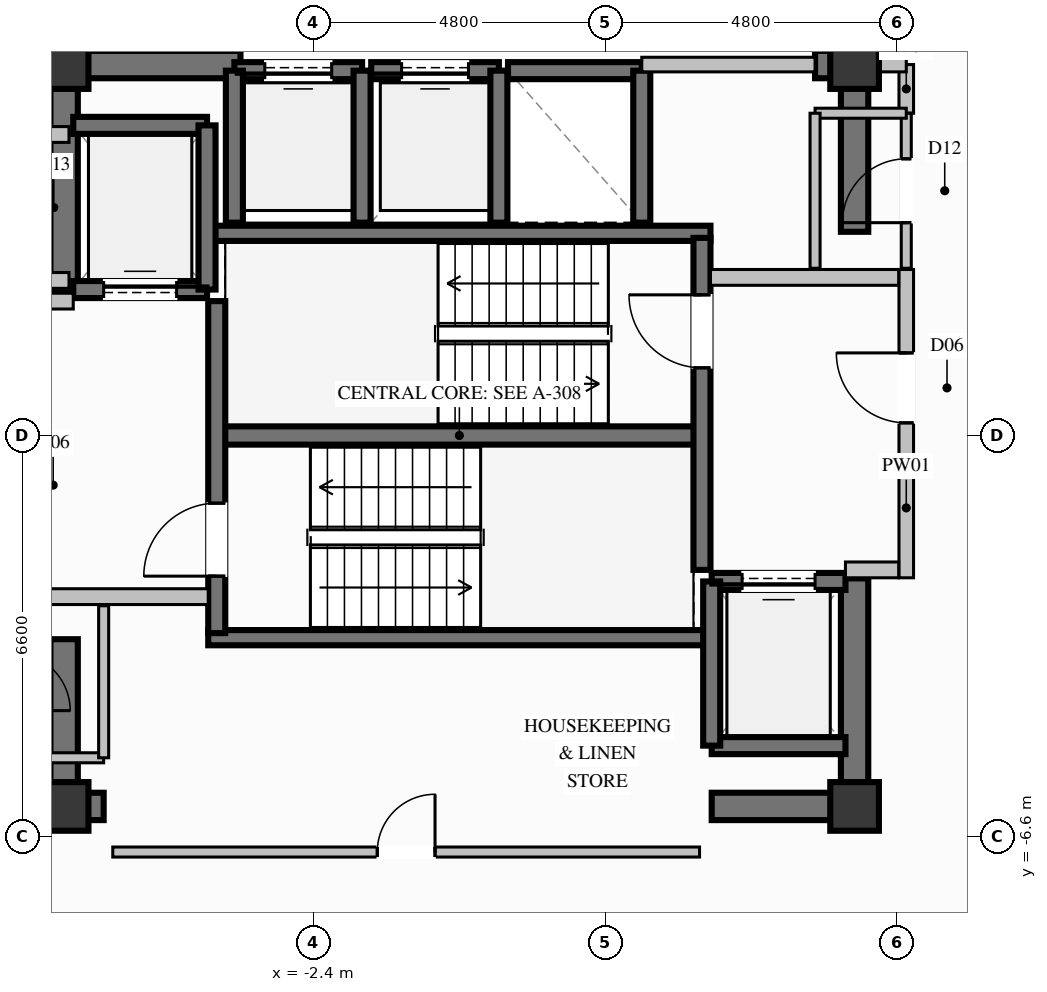
"""IFC4 building model, lengths in metres.
Left out: names, types, materials, properties, quantities, classifications, styles, units other than length and angle.
Written with IfcOpenShell. Run it as: python <this file> out.ifc"""

import sys

from ifc_helpers import new_model, si_unit, direction, frame, frame_2d, origin, origin_2d, place, context, subcontext, project, spatial, rectangle, extrude, element, fill, save


model = new_model("IFC4")
c1 = context("Model", 3, precision=1e-05, world=origin(), true_north=direction((0.0, 1.0)))
c2 = subcontext(c1, "Body", "Model", "MODEL_VIEW")
j1 = project(units=[si_unit("LENGTHUNIT", "METRE"), si_unit("PLANEANGLEUNIT", "RADIAN")], contexts=[c1])
p1 = place(None, origin())
s1 = spatial("IfcSite", under=j1, at=p1, CompositionType="ELEMENT")
p2 = place(p1, origin())
s2 = spatial("IfcBuilding", under=s1, at=p2, CompositionType="ELEMENT")
p3 = place(p2, frame((0.0, 0.0, 250.6)))
s3 = spatial("IfcBuildingStorey", under=s2, at=p3, CompositionType="ELEMENT", Elevation=250.6)
for number, where, z_axis, x_axis in (
    (1, (-6.5, -6.1, 0.0), (0.0, 0.0, 1.0), (1.0, 0.0, 0.0)),
    (2, (6.5, -6.1, 0.0), (0.0, 0.0, 1.0), (1.0, 0.0, 0.0)),
    (3, (6.5, 6.1, 0.0), (0.0, 0.0, 1.0), (1.0, 0.0, 0.0)),
    (4, (-6.5, 6.1, 0.0), (0.0, 0.0, 1.0), (1.0, 0.0, 0.0)),
):
    element("IfcColumn", number, at=place(p3, frame(where, z_axis=z_axis, x_axis=x_axis)), inside=s3, PredefinedType="COLUMN", context=c2, shape_type="SweptSolid", body=[
        extrude(rectangle(XDim=0.8, YDim=0.8, at=origin_2d()), origin(), (0.0, 0.0, 1.0), 3.8),
    ])
p4 = place(p3, frame((-3.99, 0.0, 0.0), z_axis=(0.0, 0.0, 1.0), x_axis=(1.0, 0.0, 0.0)))
e5 = element("IfcWall", 5, at=p4, inside=s3, PredefinedType="SHEAR", context=c2, shape_type="SweptSolid", body=[
    extrude(rectangle(XDim=7.98, YDim=0.3, at=frame_2d((3.99, 0.0))), origin(), (0.0, 0.0, 1.0), 3.8),
])
for number, where, z_axis, x_axis in (
    (6, (-4.13, -3.325, 0.0), (0.0, 0.0, 1.0), (1.0, 0.0, 0.0)),
    (7, (-4.13, 3.325, 0.0), (0.0, 0.0, 1.0), (1.0, 0.0, 0.0)),
):
    element("IfcWall", number, at=place(p3, frame(where, z_axis=z_axis, x_axis=x_axis)), inside=s3, PredefinedType="SOLIDWALL", context=c2, shape_type="SweptSolid", body=[
        extrude(rectangle(XDim=8.26, YDim=0.25, at=frame_2d((4.13, 0.0))), origin(), (0.0, 0.0, 1.0), 3.8),
    ])
p5 = place(p3, frame((-6.275, -6.1, 0.0), z_axis=(0.0, 0.0, 1.0), x_axis=(1.0, 0.0, 0.0)))
e8 = element("IfcWall", 8, at=p5, inside=s3, PredefinedType="SHEAR", context=c2, shape_type="SweptSolid", body=[
    extrude(rectangle(XDim=0.425, YDim=0.45, at=frame_2d((0.212, 0.0))), origin(), (0.0, 0.0, 1.0), 3.8),
])
p6 = place(p3, frame((4.15, -6.1, 0.0), z_axis=(0.0, 0.0, 1.0), x_axis=(1.0, 0.0, 0.0)))
e9 = element("IfcWall", 9, at=p6, inside=s3, PredefinedType="SHEAR", context=c2, shape_type="SweptSolid", body=[
    extrude(rectangle(XDim=2.125, YDim=0.45, at=frame_2d((1.062, 0.0))), origin(), (0.0, 0.0, 1.0), 3.8),
])
p7 = place(p3, frame((-6.275, 6.1, 0.0), z_axis=(0.0, 0.0, 1.0), x_axis=(1.0, 0.0, 0.0)))
e10 = element("IfcWall", 10, at=p7, inside=s3, PredefinedType="SHEAR", context=c2, shape_type="SweptSolid", body=[
    extrude(rectangle(XDim=2.675, YDim=0.45, at=frame_2d((1.337, 0.0))), origin(), (0.0, 0.0, 1.0), 3.8),
])
p8 = place(p3, frame((5.85, 6.1, 0.0), z_axis=(0.0, 0.0, 1.0), x_axis=(1.0, 0.0, 0.0)))
e11 = element("IfcWall", 11, at=p8, inside=s3, PredefinedType="SHEAR", context=c2, shape_type="SweptSolid", body=[
    extrude(rectangle(XDim=0.425, YDim=0.45, at=frame_2d((0.212, 0.0))), origin(), (0.0, 0.0, 1.0), 3.8),
])
p9 = place(p3, frame((-6.5, 2.35, 0.0), z_axis=(0.0, 0.0, 1.0), x_axis=(0.0, 1.0, 0.0)))
e12 = element("IfcWall", 12, at=p9, inside=s3, PredefinedType="SHEAR", context=c2, shape_type="SweptSolid", body=[
    extrude(rectangle(XDim=3.975, YDim=0.45, at=frame_2d((1.987, 0.0))), origin(), (0.0, 0.0, 1.0), 3.8),
])
p10 = place(p3, frame((-6.5, -6.325, 0.0), z_axis=(0.0, 0.0, 1.0), x_axis=(0.0, 1.0, 0.0)))
e13 = element("IfcWall", 13, at=p10, inside=s3, PredefinedType="SHEAR", context=c2, shape_type="SweptSolid", body=[
    extrude(rectangle(XDim=2.975, YDim=0.45, at=frame_2d((1.487, 0.0))), origin(), (0.0, 0.0, 1.0), 3.8),
])
p11 = place(p3, frame((6.5, -6.325, 0.0), z_axis=(0.0, 0.0, 1.0), x_axis=(0.0, 1.0, 0.0)))
e14 = element("IfcWall", 14, at=p11, inside=s3, PredefinedType="SHEAR", context=c2, shape_type="SweptSolid", body=[
    extrude(rectangle(XDim=3.975, YDim=0.45, at=frame_2d((1.987, 0.0))), origin(), (0.0, 0.0, 1.0), 3.8),
])
p12 = place(p3, frame((6.5, 3.35, 0.0), z_axis=(0.0, 0.0, 1.0), x_axis=(0.0, 1.0, 0.0)))
e15 = element("IfcWall", 15, at=p12, inside=s3, PredefinedType="SHEAR", context=c2, shape_type="SweptSolid", body=[
    extrude(rectangle(XDim=2.975, YDim=0.45, at=frame_2d((1.487, 0.0))), origin(), (0.0, 0.0, 1.0), 3.8),
])
p13 = place(p3, frame((-1.6, 6.0, 0.0), z_axis=(0.0, 0.0, 1.0), x_axis=(-1.0, 0.0, 0.0)))
e16 = element("IfcWall", 16, at=p13, inside=s3, PredefinedType="SOLIDWALL", context=c2, shape_type="SweptSolid", body=[
    extrude(rectangle(XDim=2.1, YDim=0.28, at=frame_2d((1.05, 0.0))), origin(), (0.0, 0.0, 1.0), 3.57),
])
p14 = place(p13, frame((0.5, 0.0, 0.0)))
e17 = element("IfcOpeningElement", 17, at=p14, cuts=e16, PredefinedType="OPENING", context=c2, shape_type="SweptSolid", body=[
    extrude(rectangle(XDim=1.1, YDim=2.2, at=frame_2d((0.55, 1.1))), frame((0.0, 0.15, 0.0), z_axis=(0.0, -1.0, 0.0), x_axis=(1.0, 0.0, 0.0)), (0.0, 0.0, 1.0), 0.3),
])
for number, where, z_axis, x_axis in (
    (18, (-3.7, 6.0, 0.0), (0.0, 0.0, 1.0), (0.0, -1.0, 0.0)),
    (19, (-1.6, 3.5, 0.0), (0.0, 0.0, 1.0), (0.0, 1.0, 0.0)),
):
    element("IfcWall", number, at=place(p3, frame(where, z_axis=z_axis, x_axis=x_axis)), inside=s3, PredefinedType="SOLIDWALL", context=c2, shape_type="SweptSolid", body=[
        extrude(rectangle(XDim=2.5, YDim=0.28, at=frame_2d((1.25, 0.0))), origin(), (0.0, 0.0, 1.0), 3.57),
    ])
p15 = place(p3, frame((0.65, 6.0, 0.0), z_axis=(0.0, 0.0, 1.0), x_axis=(-1.0, 0.0, 0.0)))
e20 = element("IfcWall", 20, at=p15, inside=s3, PredefinedType="SOLIDWALL", context=c2, shape_type="SweptSolid", body=[
    extrude(rectangle(XDim=2.1, YDim=0.28, at=frame_2d((1.05, 0.0))), origin(), (0.0, 0.0, 1.0), 3.57),
])
p16 = place(p15, frame((0.5, 0.0, 0.0)))
e21 = element("IfcOpeningElement", 21, at=p16, cuts=e20, PredefinedType="OPENING", context=c2, shape_type="SweptSolid", body=[
    extrude(rectangle(XDim=1.1, YDim=2.2, at=frame_2d((0.55, 1.1))), frame((0.0, 0.15, 0.0), z_axis=(0.0, -1.0, 0.0), x_axis=(1.0, 0.0, 0.0)), (0.0, 0.0, 1.0), 0.3),
])
p17 = place(p3, frame((0.65, 3.5, 0.0), z_axis=(0.0, 0.0, 1.0), x_axis=(0.0, 1.0, 0.0)))
e22 = element("IfcWall", 22, at=p17, inside=s3, PredefinedType="SOLIDWALL", context=c2, shape_type="SweptSolid", body=[
    extrude(rectangle(XDim=2.5, YDim=0.28, at=frame_2d((1.25, 0.0))), origin(), (0.0, 0.0, 1.0), 3.57),
])
p18 = place(p3, frame((3.0, 6.0, 0.0), z_axis=(0.0, 0.0, 1.0), x_axis=(-1.0, 0.0, 0.0)))
e23 = element("IfcWall", 23, at=p18, inside=s3, PredefinedType="SOLIDWALL", context=c2, shape_type="SweptSolid", body=[
    extrude(rectangle(XDim=2.2, YDim=0.28, at=frame_2d((1.1, 0.0))), origin(), (0.0, 0.0, 1.0), 3.57),
])
p19 = place(p3, frame((3.0, 3.5, 0.0), z_axis=(0.0, 0.0, 1.0), x_axis=(0.0, 1.0, 0.0)))
e24 = element("IfcWall", 24, at=p19, inside=s3, PredefinedType="SOLIDWALL", context=c2, shape_type="SweptSolid", body=[
    extrude(rectangle(XDim=2.5, YDim=0.28, at=frame_2d((1.25, 0.0))), origin(), (0.0, 0.0, 1.0), 3.57),
])
p20 = place(p3, frame((-6.35, 2.4, 0.0), z_axis=(0.0, 0.0, 1.0), x_axis=(1.0, 0.0, 0.0)))
e25 = element("IfcWall", 25, at=p20, inside=s3, PredefinedType="SOLIDWALL", context=c2, shape_type="SweptSolid", body=[
    extrude(rectangle(XDim=2.2, YDim=0.28, at=frame_2d((1.1, 0.0))), origin(), (0.0, 0.0, 1.0), 3.57),
])
p21 = place(p20, frame((0.5, 0.0, 0.0)))
e26 = element("IfcOpeningElement", 26, at=p21, cuts=e25, PredefinedType="OPENING", context=c2, shape_type="SweptSolid", body=[
    extrude(rectangle(XDim=1.2, YDim=2.2, at=frame_2d((0.6, 1.1))), frame((0.0, 0.15, 0.0), z_axis=(0.0, -1.0, 0.0), x_axis=(1.0, 0.0, 0.0)), (0.0, 0.0, 1.0), 0.3),
])
p22 = place(p3, frame((-4.15, 5.1, 0.0), z_axis=(0.0, 0.0, 1.0), x_axis=(-1.0, 0.0, 0.0)))
e27 = element("IfcWall", 27, at=p22, inside=s3, PredefinedType="SOLIDWALL", context=c2, shape_type="SweptSolid", body=[
    extrude(rectangle(XDim=2.2, YDim=0.28, at=frame_2d((1.1, 0.0))), origin(), (0.0, 0.0, 1.0), 3.57),
])
p23 = place(p3, frame((-4.15, 2.4, 0.0), z_axis=(0.0, 0.0, 1.0), x_axis=(0.0, 1.0, 0.0)))
e28 = element("IfcWall", 28, at=p23, inside=s3, PredefinedType="SOLIDWALL", context=c2, shape_type="SweptSolid", body=[
    extrude(rectangle(XDim=2.7, YDim=0.28, at=frame_2d((1.35, 0.0))), origin(), (0.0, 0.0, 1.0), 3.57),
])
p24 = place(p3, frame((4.15, -5.1, 0.0), z_axis=(0.0, 0.0, 1.0), x_axis=(1.0, 0.0, 0.0)))
e29 = element("IfcWall", 29, at=p24, inside=s3, PredefinedType="SOLIDWALL", context=c2, shape_type="SweptSolid", body=[
    extrude(rectangle(XDim=2.2, YDim=0.28, at=frame_2d((1.1, 0.0))), origin(), (0.0, 0.0, 1.0), 3.57),
])
p25 = place(p3, frame((6.35, -2.4, 0.0), z_axis=(0.0, 0.0, 1.0), x_axis=(-1.0, 0.0, 0.0)))
e30 = element("IfcWall", 30, at=p25, inside=s3, PredefinedType="SOLIDWALL", context=c2, shape_type="SweptSolid", body=[
    extrude(rectangle(XDim=2.2, YDim=0.28, at=frame_2d((1.1, 0.0))), origin(), (0.0, 0.0, 1.0), 3.57),
])
p26 = place(p25, frame((0.5, 0.0, 0.0)))
e31 = element("IfcOpeningElement", 31, at=p26, cuts=e30, PredefinedType="OPENING", context=c2, shape_type="SweptSolid", body=[
    extrude(rectangle(XDim=1.2, YDim=2.2, at=frame_2d((0.6, 1.1))), frame((0.0, 0.15, 0.0), z_axis=(0.0, -1.0, 0.0), x_axis=(1.0, 0.0, 0.0)), (0.0, 0.0, 1.0), 0.3),
])
p27 = place(p3, frame((4.15, -2.4, 0.0), z_axis=(0.0, 0.0, 1.0), x_axis=(0.0, -1.0, 0.0)))
e32 = element("IfcWall", 32, at=p27, inside=s3, PredefinedType="SOLIDWALL", context=c2, shape_type="SweptSolid", body=[
    extrude(rectangle(XDim=2.7, YDim=0.28, at=frame_2d((1.35, 0.0))), origin(), (0.0, 0.0, 1.0), 3.57),
])
p28 = place(p3, frame((-3.99, -3.25, 0.0), z_axis=(0.0, 0.0, 1.0), x_axis=(0.0, 1.0, 0.0)))
e33 = element("IfcWall", 33, at=p28, inside=s3, PredefinedType="SOLIDWALL", context=c2, shape_type="SweptSolid", body=[
    extrude(rectangle(XDim=5.46, YDim=0.28, at=frame_2d((2.73, 0.0))), origin(), (0.0, 0.0, 1.0), 3.57),
])
p29 = place(p28, frame((0.937, 0.0, 0.0)))
e34 = element("IfcOpeningElement", 34, at=p29, cuts=e33, PredefinedType="OPENING", context=c2, shape_type="SweptSolid", body=[
    extrude(rectangle(XDim=1.2, YDim=2.2, at=frame_2d((0.6, 1.1))), frame((0.0, 0.15, 0.0), z_axis=(0.0, -1.0, 0.0), x_axis=(1.0, 0.0, 0.0)), (0.0, 0.0, 1.0), 0.3),
])
p30 = place(p3, frame((3.99, -2.21, 0.0), z_axis=(0.0, 0.0, 1.0), x_axis=(0.0, 1.0, 0.0)))
e35 = element("IfcWall", 35, at=p30, inside=s3, PredefinedType="SOLIDWALL", context=c2, shape_type="SweptSolid", body=[
    extrude(rectangle(XDim=5.46, YDim=0.28, at=frame_2d((2.73, 0.0))), origin(), (0.0, 0.0, 1.0), 3.57),
])
p31 = place(p30, frame((3.323, 0.0, 0.0)))
e36 = element("IfcOpeningElement", 36, at=p31, cuts=e35, PredefinedType="OPENING", context=c2, shape_type="SweptSolid", body=[
    extrude(rectangle(XDim=1.2, YDim=2.2, at=frame_2d((0.6, 1.1))), frame((0.0, 0.15, 0.0), z_axis=(0.0, -1.0, 0.0), x_axis=(1.0, 0.0, 0.0)), (0.0, 0.0, 1.0), 0.3),
])
p32 = place(p3, frame((-7.225, -2.65, 0.0), z_axis=(0.0, 0.0, 1.0), x_axis=(1.0, 0.0, 0.0)))
e37 = element("IfcWall", 37, at=p32, inside=s3, PredefinedType="PARTITIONING", context=c2, shape_type="SweptSolid", body=[
    extrude(rectangle(XDim=3.095, YDim=0.26, at=frame_2d((1.548, 0.0))), origin(), (0.0, 0.0, 1.0), 3.57),
])
p33 = place(p3, frame((-7.225, 2.21, 0.0), z_axis=(0.0, 0.0, 1.0), x_axis=(1.0, 0.0, 0.0)))
e38 = element("IfcWall", 38, at=p33, inside=s3, PredefinedType="PARTITIONING", context=c2, shape_type="SweptSolid", body=[
    extrude(rectangle(XDim=0.875, YDim=0.26, at=frame_2d((0.438, 0.0))), origin(), (0.0, 0.0, 1.0), 3.57),
])
p34 = place(p3, frame((7.35, -2.34, 0.0), z_axis=(0.0, 0.0, 1.0), x_axis=(0.0, 1.0, 0.0)))
e39 = element("IfcWall", 39, at=p34, inside=s3, PredefinedType="PARTITIONING", context=c2, shape_type="SweptSolid", body=[
    extrude(rectangle(XDim=5.07, YDim=0.24, at=frame_2d((2.535, 0.0))), origin(), (0.0, 0.0, 1.0), 2.655),
])
p35 = place(p34, frame((2.548, 0.0, 0.0)))
e40 = element("IfcOpeningElement", 40, at=p35, cuts=e39, PredefinedType="OPENING", context=c2, shape_type="SweptSolid", body=[
    extrude(rectangle(XDim=1.15, YDim=2.2, at=frame_2d((0.575, 1.1))), frame((0.0, 0.13, 0.0), z_axis=(0.0, -1.0, 0.0), x_axis=(1.0, 0.0, 0.0)), (0.0, 0.0, 1.0), 0.26),
])
p36 = place(p3, frame((6.35, -2.21, 0.0), z_axis=(0.0, 0.0, 1.0), x_axis=(1.0, 0.0, 0.0)))
e41 = element("IfcWall", 41, at=p36, inside=s3, PredefinedType="PARTITIONING", context=c2, shape_type="SweptSolid", body=[
    extrude(rectangle(XDim=0.875, YDim=0.26, at=frame_2d((0.438, 0.0))), origin(), (0.0, 0.0, 1.0), 3.57),
])
p37 = place(p3, frame((4.13, 2.6, 0.0), z_axis=(0.0, 0.0, 1.0), x_axis=(1.0, 0.0, 0.0)))
e42 = element("IfcWall", 42, at=p37, inside=s3, PredefinedType="PARTITIONING", context=c2, shape_type="SweptSolid", body=[
    extrude(rectangle(XDim=3.095, YDim=0.26, at=frame_2d((1.548, 0.0))), origin(), (0.0, 0.0, 1.0), 3.57),
])
for number, where, z_axis, x_axis in (
    (43, (-7.35, 4.95, 0.0), (0.0, 0.0, 1.0), (1.0, 0.0, 0.0)),
    (44, (-7.35, 2.55, 0.0), (0.0, 0.0, 1.0), (1.0, 0.0, 0.0)),
):
    element("IfcWall", number, at=place(p3, frame(where, z_axis=z_axis, x_axis=x_axis)), inside=s3, PredefinedType="PARTITIONING", context=c2, shape_type="SweptSolid", body=[
        extrude(rectangle(XDim=0.93, YDim=0.26, at=frame_2d((0.465, 0.0))), origin(), (0.0, 0.0, 1.0), 3.57),
    ])
p38 = place(p3, frame((3.0, 6.1, 0.0), z_axis=(0.0, 0.0, 1.0), x_axis=(1.0, 0.0, 0.0)))
e45 = element("IfcWall", 45, at=p38, inside=s3, PredefinedType="PARTITIONING", context=c2, shape_type="SweptSolid", body=[
    extrude(rectangle(XDim=2.85, YDim=0.24, at=frame_2d((1.425, 0.0))), origin(), (0.0, 0.0, 1.0), 2.655),
])
p39 = place(p3, frame((7.35, 5.3, 0.0), z_axis=(0.0, 0.0, 1.0), x_axis=(0.0, 1.0, 0.0)))
e46 = element("IfcWall", 46, at=p39, inside=s3, PredefinedType="PARTITIONING", context=c2, shape_type="SweptSolid", body=[
    extrude(rectangle(XDim=0.8, YDim=0.24, at=frame_2d((0.4, 0.0))), origin(), (0.0, 0.0, 1.0), 2.655),
])
for number, where, z_axis, x_axis in (
    (47, (6.5, 6.1, 0.0), (0.0, 0.0, 1.0), (1.0, 0.0, 0.0)),
    (48, (-7.35, 6.1, 0.0), (0.0, 0.0, 1.0), (1.0, 0.0, 0.0)),
):
    element("IfcWall", number, at=place(p3, frame(where, z_axis=z_axis, x_axis=x_axis)), inside=s3, PredefinedType="PARTITIONING", context=c2, shape_type="SweptSolid", body=[
        extrude(rectangle(XDim=0.85, YDim=0.24, at=frame_2d((0.425, 0.0))), origin(), (0.0, 0.0, 1.0), 3.086),
    ])
p40 = place(p3, frame((-7.35, -5.3, 0.0), z_axis=(0.0, 0.0, 1.0), x_axis=(1.0, 0.0, 0.0)))
e49 = element("IfcWall", 49, at=p40, inside=s3, PredefinedType="PARTITIONING", context=c2, shape_type="SweptSolid", body=[
    extrude(rectangle(XDim=1.5, YDim=0.165, at=frame_2d((0.75, 0.0))), origin(), (0.0, 0.0, 1.0), 2.655),
])
p41 = place(p3, frame((-5.85, -5.3, 0.0), z_axis=(0.0, 0.0, 1.0), x_axis=(0.0, 1.0, 0.0)))
e50 = element("IfcWall", 50, at=p41, inside=s3, PredefinedType="PARTITIONING", context=c2, shape_type="SweptSolid", body=[
    extrude(rectangle(XDim=2.5, YDim=0.165, at=frame_2d((1.25, 0.0))), origin(), (0.0, 0.0, 1.0), 2.655),
])
p42 = place(p3, frame((7.35, 2.75, 0.0), z_axis=(0.0, 0.0, 1.0), x_axis=(0.0, 1.0, 0.0)))
e51 = element("IfcWall", 51, at=p42, inside=s3, PredefinedType="PARTITIONING", context=c2, shape_type="SweptSolid", body=[
    extrude(rectangle(XDim=2.55, YDim=0.165, at=frame_2d((1.275, 0.0))), origin(), (0.0, 0.0, 1.0), 3.57),
])
p43 = place(p42, frame((0.75, 0.0, 0.0)))
e52 = element("IfcOpeningElement", 52, at=p43, cuts=e51, PredefinedType="OPENING", context=c2, shape_type="SweptSolid", body=[
    extrude(rectangle(XDim=1.05, YDim=2.15, at=frame_2d((0.525, 1.075))), frame((0.0, 0.093, 0.0), z_axis=(0.0, -1.0, 0.0), x_axis=(1.0, 0.0, 0.0)), (0.0, 0.0, 1.0), 0.185),
])
p44 = place(p3, frame((7.35, 5.3, 0.0), z_axis=(0.0, 0.0, 1.0), x_axis=(-1.0, 0.0, 0.0)))
e53 = element("IfcWall", 53, at=p44, inside=s3, PredefinedType="PARTITIONING", context=c2, shape_type="SweptSolid", body=[
    extrude(rectangle(XDim=1.5, YDim=0.165, at=frame_2d((0.75, 0.0))), origin(), (0.0, 0.0, 1.0), 2.655),
])
p45 = place(p3, frame((5.85, 5.3, 0.0), z_axis=(0.0, 0.0, 1.0), x_axis=(0.0, -1.0, 0.0)))
e54 = element("IfcWall", 54, at=p45, inside=s3, PredefinedType="PARTITIONING", context=c2, shape_type="SweptSolid", body=[
    extrude(rectangle(XDim=2.55, YDim=0.165, at=frame_2d((1.275, 0.0))), origin(), (0.0, 0.0, 1.0), 2.655),
])
p46 = place(p3, frame((-5.7, -6.85, 0.0), z_axis=(0.0, 0.0, 1.0), x_axis=(1.0, 0.0, 0.0)))
e55 = element("IfcWall", 55, at=p46, inside=s3, PredefinedType="PARTITIONING", context=c2, shape_type="SweptSolid", body=[
    extrude(rectangle(XDim=9.65, YDim=0.165, at=frame_2d((4.825, 0.0))), origin(), (0.0, 0.0, 1.0), 2.655),
])
p47 = place(p46, frame((4.35, 0.0, 0.0)))
e56 = element("IfcOpeningElement", 56, at=p47, cuts=e55, PredefinedType="OPENING", context=c2, shape_type="SweptSolid", body=[
    extrude(rectangle(XDim=0.95, YDim=2.1, at=frame_2d((0.475, 1.05))), frame((0.0, 0.093, 0.0), z_axis=(0.0, -1.0, 0.0), x_axis=(1.0, 0.0, 0.0)), (0.0, 0.0, 1.0), 0.185),
])
p48 = place(p14, origin())
e57 = element("IfcDoor", 57, at=p48, inside=s3, OperationType="SLIDING_TO_LEFT", PredefinedType="DOOR", context=c2, shape_type="SweptSolid", body=[
    extrude(rectangle(XDim=1.1, YDim=2.2, at=frame_2d((0.55, 1.1))), frame((0.0, 0.025, 0.0), z_axis=(0.0, -1.0, 0.0), x_axis=(1.0, 0.0, 0.0)), (0.0, 0.0, 1.0), 0.05),
])
fill(e17, e57)
p49 = place(p16, origin())
e58 = element("IfcDoor", 58, at=p49, inside=s3, OperationType="SLIDING_TO_LEFT", PredefinedType="DOOR", context=c2, shape_type="SweptSolid", body=[
    extrude(rectangle(XDim=1.1, YDim=2.2, at=frame_2d((0.55, 1.1))), frame((0.0, 0.025, 0.0), z_axis=(0.0, -1.0, 0.0), x_axis=(1.0, 0.0, 0.0)), (0.0, 0.0, 1.0), 0.05),
])
fill(e21, e58)
p50 = place(p21, origin())
e59 = element("IfcDoor", 59, at=p50, inside=s3, OperationType="SLIDING_TO_LEFT", PredefinedType="DOOR", context=c2, shape_type="SweptSolid", body=[
    extrude(rectangle(XDim=1.2, YDim=2.2, at=frame_2d((0.6, 1.1))), frame((0.0, 0.025, 0.0), z_axis=(0.0, -1.0, 0.0), x_axis=(1.0, 0.0, 0.0)), (0.0, 0.0, 1.0), 0.05),
])
fill(e26, e59)
p51 = place(p26, origin())
e60 = element("IfcDoor", 60, at=p51, inside=s3, OperationType="SLIDING_TO_LEFT", PredefinedType="DOOR", context=c2, shape_type="SweptSolid", body=[
    extrude(rectangle(XDim=1.2, YDim=2.2, at=frame_2d((0.6, 1.1))), frame((0.0, 0.025, 0.0), z_axis=(0.0, -1.0, 0.0), x_axis=(1.0, 0.0, 0.0)), (0.0, 0.0, 1.0), 0.05),
])
fill(e31, e60)
p52 = place(p29, origin())
e61 = element("IfcDoor", 61, at=p52, inside=s3, OperationType="SINGLE_SWING_LEFT", PredefinedType="DOOR", context=c2, shape_type="SweptSolid", body=[
    extrude(rectangle(XDim=1.2, YDim=2.2, at=frame_2d((0.6, 1.1))), frame((0.0, 0.025, 0.0), z_axis=(0.0, -1.0, 0.0), x_axis=(1.0, 0.0, 0.0)), (0.0, 0.0, 1.0), 0.05),
])
fill(e34, e61)
p53 = place(p31, origin())
e62 = element("IfcDoor", 62, at=p53, inside=s3, OperationType="SINGLE_SWING_RIGHT", PredefinedType="DOOR", context=c2, shape_type="SweptSolid", body=[
    extrude(rectangle(XDim=1.2, YDim=2.2, at=frame_2d((0.6, 1.1))), frame((0.0, 0.025, 0.0), z_axis=(0.0, -1.0, 0.0), x_axis=(1.0, 0.0, 0.0)), (0.0, 0.0, 1.0), 0.05),
])
fill(e36, e62)
p54 = place(p35, origin())
e63 = element("IfcDoor", 63, at=p54, inside=s3, OperationType="SINGLE_SWING_RIGHT", PredefinedType="DOOR", context=c2, shape_type="SweptSolid", body=[
    extrude(rectangle(XDim=1.15, YDim=2.2, at=frame_2d((0.575, 1.1))), frame((0.0, 0.025, 0.0), z_axis=(0.0, -1.0, 0.0), x_axis=(1.0, 0.0, 0.0)), (0.0, 0.0, 1.0), 0.05),
])
fill(e40, e63)
p55 = place(p43, origin())
e64 = element("IfcDoor", 64, at=p55, inside=s3, OperationType="SINGLE_SWING_LEFT", PredefinedType="DOOR", context=c2, shape_type="SweptSolid", body=[
    extrude(rectangle(XDim=1.05, YDim=2.15, at=frame_2d((0.525, 1.075))), frame((0.0, 0.025, 0.0), z_axis=(0.0, -1.0, 0.0), x_axis=(1.0, 0.0, 0.0)), (0.0, 0.0, 1.0), 0.05),
])
fill(e52, e64)
p56 = place(p47, origin())
e65 = element("IfcDoor", 65, at=p56, inside=s3, OperationType="SINGLE_SWING_RIGHT", PredefinedType="DOOR", context=c2, shape_type="SweptSolid", body=[
    extrude(rectangle(XDim=0.95, YDim=2.1, at=frame_2d((0.475, 1.05))), frame((0.0, 0.025, 0.0), z_axis=(0.0, -1.0, 0.0), x_axis=(1.0, 0.0, 0.0)), (0.0, 0.0, 1.0), 0.05),
])
fill(e56, e65)
save(model, sys.argv[1])
